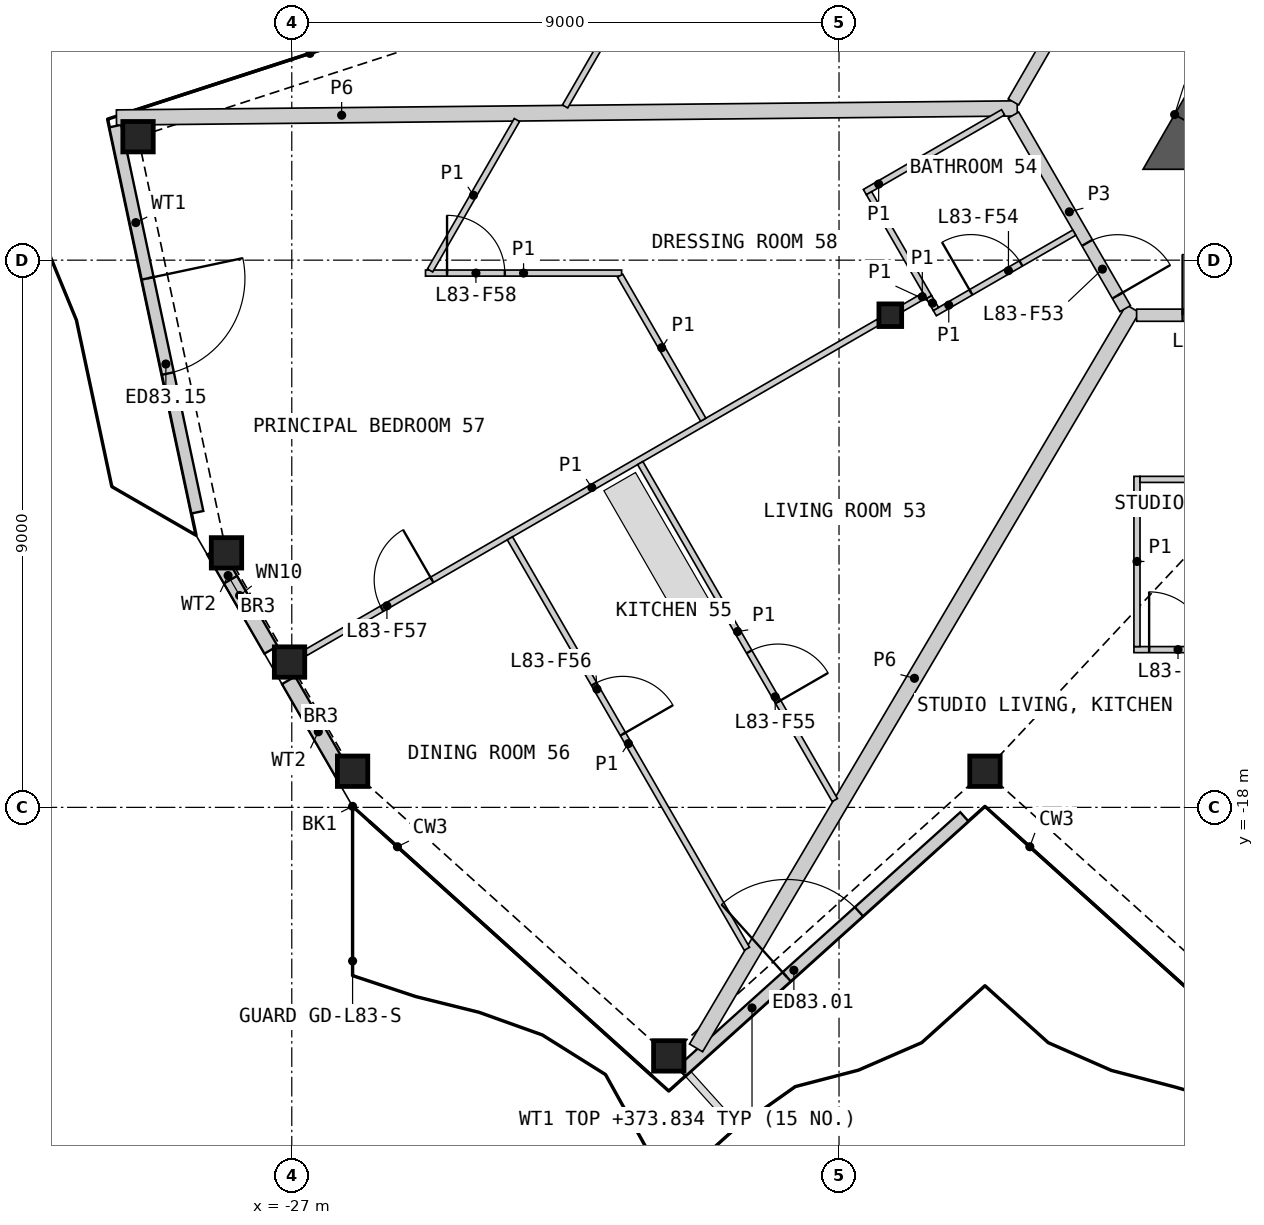
"""IFC4 building model, lengths in metres.
Left out: names, types, materials, properties, quantities, classifications, styles, units other than length and angle.
Written with IfcOpenShell. Run it as: python <this file> out.ifc"""

import sys

from ifc_helpers import new_model, si_unit, direction, frame, frame_2d, origin, origin_2d, place, context, subcontext, project, spatial, polyline, rectangle, hollow_rectangle, i_section, outline, extrude, element, fill, save


model = new_model("IFC4")
c1 = context("Model", 3, precision=1e-05, world=origin(), true_north=direction((0.0, 1.0)))
c2 = subcontext(c1, "Body", "Model", "MODEL_VIEW")
j1 = project(units=[si_unit("LENGTHUNIT", "METRE"), si_unit("PLANEANGLEUNIT", "RADIAN")], contexts=[c1])
p1 = place(None, origin())
s1 = spatial("IfcSite", under=j1, at=p1, CompositionType="ELEMENT")
p2 = place(p1, origin())
s2 = spatial("IfcBuilding", under=s1, at=p2, CompositionType="ELEMENT")
p3 = place(p2, frame((0.0, 0.0, 371.2)))
s3 = spatial("IfcBuildingStorey", under=s2, at=p3, CompositionType="ELEMENT", Elevation=371.2)
for number, where, z_axis, x_axis in (
    (1, (-26.0, -17.406, 0.0), (0.0, 0.0, 1.0), (1.0, 0.0, 0.0)),
    (2, (-20.8, -22.088, 0.0), (0.0, 0.0, 1.0), (1.0, 0.0, 0.0)),
    (3, (-15.6, -17.406, 0.0), (0.0, 0.0, 1.0), (1.0, 0.0, 0.0)),
    (4, (-29.529, -6.969, 0.0), (0.0, 0.0, 1.0), (1.0, 0.0, 0.0)),
    (5, (-28.074, -13.814, 0.0), (0.0, 0.0, 1.0), (1.0, 0.0, 0.0)),
    (6, (-27.037, -15.61, 0.0), (0.0, 0.0, 1.0), (1.0, 0.0, 0.0)),
):
    element("IfcColumn", number, at=place(p3, frame(where, z_axis=z_axis, x_axis=x_axis)), inside=s3, PredefinedType="COLUMN", context=c2, shape_type="SweptSolid", body=[
        extrude(hollow_rectangle(XDim=0.5, YDim=0.5, WallThickness=0.03, at=origin_2d()), origin(), (0.0, 0.0, 1.0), 3.4),
    ])
p4 = place(p3, frame((-17.157, -9.906, 0.0), z_axis=(0.0, 0.0, 1.0), x_axis=(1.0, 0.0, 0.0)))
e7 = element("IfcColumn", 7, at=p4, inside=s3, PredefinedType="COLUMN", context=c2, shape_type="SweptSolid", body=[
    extrude(i_section(OverallWidth=0.374, OverallDepth=0.372, WebThickness=0.016, FlangeThickness=0.026, at=origin_2d()), origin(), (0.0, 0.0, 1.0), 3.4),
])
p5 = place(p3, frame((-20.595, -22.346, 0.0), z_axis=(0.0, 0.0, 1.0), x_axis=(0.743137181878, 0.669139095339, 0.0)))
e8 = element("IfcWall", 8, at=p5, inside=s3, PredefinedType="SOLIDWALL", context=c2, shape_type="SweptSolid", body=[
    extrude(rectangle(XDim=6.265, YDim=0.2, at=frame_2d((3.133, 0.0))), origin(), (0.0, 0.0, 1.0), 2.634),
])
p6 = place(p5, frame((2.333, 0.0, 0.0)))
e9 = element("IfcOpeningElement", 9, at=p6, cuts=e8, PredefinedType="OPENING", context=c2, shape_type="SweptSolid", body=[
    extrude(rectangle(XDim=1.6, YDim=2.25, at=frame_2d((0.8, 1.125))), frame((0.0, 0.11, 0.0), z_axis=(0.0, -1.0, 0.0), x_axis=(1.0, 0.0, 0.0)), (0.0, 0.0, 1.0), 0.22),
])
p7 = place(p3, frame((-29.903, -6.795, 0.0), z_axis=(0.0, 0.0, 1.0), x_axis=(0.207923959653, -0.978144992832, 0.0)))
e10 = element("IfcWall", 10, at=p7, inside=s3, PredefinedType="SOLIDWALL", context=c2, shape_type="SweptSolid", body=[
    extrude(rectangle(XDim=6.493, YDim=0.2, at=frame_2d((3.247, 0.0))), origin(), (0.0, 0.0, 1.0), 2.634),
])
p8 = place(p7, frame((2.561, 0.0, 0.0)))
e11 = element("IfcOpeningElement", 11, at=p8, cuts=e10, PredefinedType="OPENING", context=c2, shape_type="SweptSolid", body=[
    extrude(rectangle(XDim=1.6, YDim=2.25, at=frame_2d((0.8, 1.125))), frame((0.0, 0.11, 0.0), z_axis=(0.0, -1.0, 0.0), x_axis=(1.0, 0.0, 0.0)), (0.0, 0.0, 1.0), 0.22),
])
p9 = place(p3, frame((-28.283, -13.779, 0.0), z_axis=(0.0, 0.0, 1.0), x_axis=(0.500044242988, -0.865999858577, 0.0)))
e12 = element("IfcWall", 12, at=p9, inside=s3, PredefinedType="SOLIDWALL", context=c2, shape_type="SweptSolid", body=[
    extrude(rectangle(XDim=1.883, YDim=0.25, at=frame_2d((0.941, 0.0))), origin(), (0.0, 0.0, 1.0), 2.634),
])
p10 = place(p9, frame((0.55, 0.0, 0.4)))
e13 = element("IfcOpeningElement", 13, at=p10, cuts=e12, PredefinedType="OPENING", context=c2, shape_type="SweptSolid", body=[
    extrude(rectangle(XDim=0.6, YDim=0.6, at=frame_2d((0.3, 0.3))), frame((0.0, 0.135, 0.0), z_axis=(0.0, -1.0, 0.0), x_axis=(1.0, 0.0, 0.0)), (0.0, 0.0, 1.0), 0.27),
])
p11 = place(p3, frame((-27.053, -15.91, 0.0), z_axis=(0.0, 0.0, 1.0), x_axis=(0.500017700655, -0.866015184065, 0.0)))
e14 = element("IfcWall", 14, at=p11, inside=s3, PredefinedType="SOLIDWALL", context=c2, shape_type="SweptSolid", body=[
    extrude(rectangle(XDim=1.957, YDim=0.25, at=frame_2d((0.978, 0.0))), origin(), (0.0, 0.0, 1.0), 2.634),
])
p12 = place(p3, frame((-9.941, -2.807, 0.0), z_axis=(0.0, 0.0, 1.0), x_axis=(-0.500020646047, -0.866013483456, 0.0)))
e15 = element("IfcWall", 15, at=p12, inside=s3, PredefinedType="SHEAR", context=c2, shape_type="SweptSolid", body=[
    extrude(rectangle(XDim=4.559, YDim=0.6, at=frame_2d((2.28, 0.0))), origin(), (0.0, 0.0, 1.0), 3.1),
])
p13 = place(p3, origin())
e16 = element("IfcWall", 16, at=p13, inside=s3, PredefinedType="SHEAR", context=c2, shape_type="SweptSolid", body=[
    extrude(outline(polyline([(-12.48, -6.606), (-11.961, -6.906), (-11.961, -7.506), (-13.0, -7.506), (-12.48, -6.606)])), origin(), (0.0, 0.0, 1.0), 3.1),
])
p14 = place(p3, frame((-29.883, -6.654, 0.0), z_axis=(0.0, 0.0, 1.0), x_axis=(0.999949143254, 0.010085182526, 0.0)))
e17 = element("IfcWall", 17, at=p14, inside=s3, PredefinedType="PARTITIONING", context=c2, shape_type="SweptSolid", body=[
    extrude(rectangle(XDim=14.815, YDim=0.25, at=frame_2d((7.408, 0.0))), origin(), (0.0, 0.0, 1.0), 2.33),
])
p15 = place(p3, frame((-20.351, -21.956, 0.0), z_axis=(0.0, 0.0, 1.0), x_axis=(0.508713003719, 0.860936164793, 0.0)))
e18 = element("IfcWall", 18, at=p15, inside=s3, PredefinedType="PARTITIONING", context=c2, shape_type="SweptSolid", body=[
    extrude(rectangle(XDim=14.122, YDim=0.25, at=frame_2d((7.061, 0.0))), origin(), (0.0, 0.0, 1.0), 2.33),
])
p16 = place(p3, frame((-13.106, -9.906, 0.0), z_axis=(0.0, 0.0, 1.0), x_axis=(1.0, 0.0, 0.0)))
e19 = element("IfcWall", 19, at=p16, inside=s3, PredefinedType="PARTITIONING", context=c2, shape_type="SweptSolid", body=[
    extrude(rectangle(XDim=4.331, YDim=0.2, at=frame_2d((2.165, 0.0))), origin(), (0.0, 0.0, 1.0), 3.1),
])
p17 = place(p16, frame((0.755, 0.0, 0.0)))
e20 = element("IfcOpeningElement", 20, at=p17, cuts=e19, PredefinedType="OPENING", context=c2, shape_type="SweptSolid", body=[
    extrude(rectangle(XDim=1.0, YDim=2.1, at=frame_2d((0.5, 1.05))), frame((0.0, 0.11, 0.0), z_axis=(0.0, -1.0, 0.0), x_axis=(1.0, 0.0, 0.0)), (0.0, 0.0, 1.0), 0.22),
])
p18 = place(p3, frame((-15.131, -6.397, 0.0), z_axis=(0.0, 0.0, 1.0), x_axis=(0.499986217557, 0.866033360935, 0.0)))
e21 = element("IfcWall", 21, at=p18, inside=s3, PredefinedType="PARTITIONING", context=c2, shape_type="SweptSolid", body=[
    extrude(rectangle(XDim=4.3, YDim=0.2, at=frame_2d((2.15, 0.0))), origin(), (0.0, 0.0, 1.0), 3.1),
])
p19 = place(p3, frame((-15.131, -6.614, 0.0), z_axis=(0.0, 0.0, 1.0), x_axis=(0.499967746641, -0.866044024469, 0.0)))
e22 = element("IfcWall", 22, at=p19, inside=s3, PredefinedType="PARTITIONING", context=c2, shape_type="SweptSolid", body=[
    extrude(rectangle(XDim=3.676, YDim=0.2, at=frame_2d((1.838, 0.0))), origin(), (0.0, 0.0, 1.0), 3.1),
])
p20 = place(p19, frame((2.426, 0.0, 0.0)))
e23 = element("IfcOpeningElement", 23, at=p20, cuts=e22, PredefinedType="OPENING", context=c2, shape_type="SweptSolid", body=[
    extrude(rectangle(XDim=1.0, YDim=2.1, at=frame_2d((0.5, 1.05))), frame((0.0, 0.11, 0.0), z_axis=(0.0, -1.0, 0.0), x_axis=(1.0, 0.0, 0.0)), (0.0, 0.0, 1.0), 0.22),
])
p21 = place(p3, frame((-26.777, -15.46, 0.0), z_axis=(0.0, 0.0, 1.0), x_axis=(0.866019680922, 0.500009912158, 0.0)))
e24 = element("IfcWall", 24, at=p21, inside=s3, PredefinedType="PARTITIONING", context=c2, shape_type="SweptSolid", body=[
    extrude(rectangle(XDim=10.881, YDim=0.1, at=frame_2d((5.44, 0.0))), origin(), (0.0, 0.0, 1.0), 2.33),
])
p22 = place(p21, frame((1.454, 0.0, 0.0)))
e25 = element("IfcOpeningElement", 25, at=p22, cuts=e24, PredefinedType="OPENING", context=c2, shape_type="SweptSolid", body=[
    extrude(rectangle(XDim=0.95, YDim=2.1, at=frame_2d((0.475, 1.05))), frame((0.0, 0.06, 0.0), z_axis=(0.0, -1.0, 0.0), x_axis=(1.0, 0.0, 0.0)), (0.0, 0.0, 1.0), 0.12),
])
p23 = place(p3, frame((-23.413, -13.575, 0.0), z_axis=(0.0, 0.0, 1.0), x_axis=(0.499998958472, -0.86602600511, 0.0)))
e26 = element("IfcWall", 26, at=p23, inside=s3, PredefinedType="PARTITIONING", context=c2, shape_type="SweptSolid", body=[
    extrude(rectangle(XDim=7.796, YDim=0.1, at=frame_2d((3.898, 0.0))), origin(), (0.0, 0.0, 1.0), 2.33),
])
p24 = place(p23, frame((2.768, 0.0, 0.0)))
e27 = element("IfcOpeningElement", 27, at=p24, cuts=e26, PredefinedType="OPENING", context=c2, shape_type="SweptSolid", body=[
    extrude(rectangle(XDim=0.95, YDim=2.1, at=frame_2d((0.475, 1.05))), frame((0.0, 0.06, 0.0), z_axis=(0.0, -1.0, 0.0), x_axis=(1.0, 0.0, 0.0)), (0.0, 0.0, 1.0), 0.12),
])
p25 = place(p3, frame((-22.505, -6.472, 0.0), z_axis=(0.0, 0.0, 1.0), x_axis=(0.499999516514, 0.866025682925, 0.0)))
e28 = element("IfcWall", 28, at=p25, inside=s3, PredefinedType="PARTITIONING", context=c2, shape_type="SweptSolid", body=[
    extrude(rectangle(XDim=6.407, YDim=0.1, at=frame_2d((3.204, 0.0))), origin(), (0.0, 0.0, 1.0), 2.33),
])
p26 = place(p25, frame((2.981, 0.0, 0.0)))
e29 = element("IfcOpeningElement", 29, at=p26, cuts=e28, PredefinedType="OPENING", context=c2, shape_type="SweptSolid", body=[
    extrude(rectangle(XDim=0.95, YDim=2.1, at=frame_2d((0.475, 1.05))), frame((0.0, 0.06, 0.0), z_axis=(0.0, -1.0, 0.0), x_axis=(1.0, 0.0, 0.0)), (0.0, 0.0, 1.0), 0.12),
])
p27 = place(p3, frame((-21.269, -12.337, 0.0), z_axis=(0.0, 0.0, 1.0), x_axis=(0.499983315828, -0.866035036182, 0.0)))
e30 = element("IfcWall", 30, at=p27, inside=s3, PredefinedType="PARTITIONING", context=c2, shape_type="SweptSolid", body=[
    extrude(rectangle(XDim=6.4, YDim=0.1, at=frame_2d((3.2, 0.0))), origin(), (0.0, 0.0, 1.0), 2.33),
])
p28 = place(p27, frame((3.584, 0.0, 0.0)))
e31 = element("IfcOpeningElement", 31, at=p28, cuts=e30, PredefinedType="OPENING", context=c2, shape_type="SweptSolid", body=[
    extrude(rectangle(XDim=0.95, YDim=2.1, at=frame_2d((0.475, 1.05))), frame((0.0, 0.06, 0.0), z_axis=(0.0, -1.0, 0.0), x_axis=(1.0, 0.0, 0.0)), (0.0, 0.0, 1.0), 0.12),
])
p29 = place(p3, frame((-13.15, -15.406, 0.0), z_axis=(0.0, 0.0, 1.0), x_axis=(1.0, 0.0, 0.0)))
e32 = element("IfcWall", 32, at=p29, inside=s3, PredefinedType="PARTITIONING", context=c2, shape_type="SweptSolid", body=[
    extrude(rectangle(XDim=5.5, YDim=0.1, at=frame_2d((2.75, 0.0))), origin(), (0.0, 0.0, 1.0), 2.33),
])
p30 = place(p29, frame((0.25, 0.0, 0.0)))
e33 = element("IfcOpeningElement", 33, at=p30, cuts=e32, PredefinedType="OPENING", context=c2, shape_type="SweptSolid", body=[
    extrude(rectangle(XDim=0.95, YDim=2.1, at=frame_2d((0.475, 1.05))), frame((0.0, 0.06, 0.0), z_axis=(0.0, -1.0, 0.0), x_axis=(1.0, 0.0, 0.0)), (0.0, 0.0, 1.0), 0.12),
])
p31 = place(p29, frame((3.591, 0.0, 0.0)))
e34 = element("IfcOpeningElement", 34, at=p31, cuts=e32, PredefinedType="OPENING", context=c2, shape_type="SweptSolid", body=[
    extrude(rectangle(XDim=0.95, YDim=2.1, at=frame_2d((0.475, 1.05))), frame((0.0, 0.06, 0.0), z_axis=(0.0, -1.0, 0.0), x_axis=(1.0, 0.0, 0.0)), (0.0, 0.0, 1.0), 0.12),
])
p32 = place(p3, frame((-24.801, -9.212, 0.0), z_axis=(0.0, 0.0, 1.0), x_axis=(1.0, 0.0, 0.0)))
e35 = element("IfcWall", 35, at=p32, inside=s3, PredefinedType="PARTITIONING", context=c2, shape_type="SweptSolid", body=[
    extrude(rectangle(XDim=3.226, YDim=0.1, at=frame_2d((1.613, 0.0))), origin(), (0.0, 0.0, 1.0), 2.33),
])
p33 = place(p32, frame((0.354, 0.0, 0.0)))
e36 = element("IfcOpeningElement", 36, at=p33, cuts=e35, PredefinedType="OPENING", context=c2, shape_type="SweptSolid", body=[
    extrude(rectangle(XDim=0.95, YDim=2.1, at=frame_2d((0.475, 1.05))), frame((0.0, 0.06, 0.0), z_axis=(0.0, -1.0, 0.0), x_axis=(1.0, 0.0, 0.0)), (0.0, 0.0, 1.0), 0.12),
])
p34 = place(p3, frame((-24.726, -9.169, 0.0), z_axis=(0.0, 0.0, 1.0), x_axis=(0.499971481985, 0.866041868042, 0.0)))
e37 = element("IfcWall", 37, at=p34, inside=s3, PredefinedType="PARTITIONING", context=c2, shape_type="SweptSolid", body=[
    extrude(rectangle(XDim=2.857, YDim=0.1, at=frame_2d((1.429, 0.0))), origin(), (0.0, 0.0, 1.0), 2.33),
])
p35 = place(p3, frame((-21.6, -9.256, 0.0), z_axis=(0.0, 0.0, 1.0), x_axis=(0.500018733116, -0.866014587945, 0.0)))
e38 = element("IfcWall", 38, at=p35, inside=s3, PredefinedType="PARTITIONING", context=c2, shape_type="SweptSolid", body=[
    extrude(rectangle(XDim=2.734, YDim=0.1, at=frame_2d((1.367, 0.0))), origin(), (0.0, 0.0, 1.0), 2.33),
])
p36 = place(p3, frame((-13.1, -15.356, 0.0), z_axis=(0.0, 0.0, 1.0), x_axis=(0.0, 1.0, 0.0)))
e39 = element("IfcWall", 39, at=p36, inside=s3, PredefinedType="PARTITIONING", context=c2, shape_type="SweptSolid", body=[
    extrude(rectangle(XDim=2.8, YDim=0.1, at=frame_2d((1.4, 0.0))), origin(), (0.0, 0.0, 1.0), 2.33),
])
p37 = place(p3, frame((-17.575, -7.881, 0.0), z_axis=(0.0, 0.0, 1.0), x_axis=(0.866036909293, 0.499980071345, 0.0)))
e40 = element("IfcWall", 40, at=p37, inside=s3, PredefinedType="PARTITIONING", context=c2, shape_type="SweptSolid", body=[
    extrude(rectangle(XDim=2.625, YDim=0.1, at=frame_2d((1.312, 0.0))), origin(), (0.0, 0.0, 1.0), 2.33),
])
p38 = place(p3, frame((-13.05, -12.606, 0.0), z_axis=(0.0, 0.0, 1.0), x_axis=(1.0, 0.0, 0.0)))
e41 = element("IfcWall", 41, at=p38, inside=s3, PredefinedType="PARTITIONING", context=c2, shape_type="SweptSolid", body=[
    extrude(rectangle(XDim=2.525, YDim=0.1, at=frame_2d((1.263, 0.0))), origin(), (0.0, 0.0, 1.0), 2.33),
])
p39 = place(p3, frame((-16.425, -9.872, 0.0), z_axis=(0.0, 0.0, 1.0), x_axis=(0.86603978909, 0.499975083092, 0.0)))
e42 = element("IfcWall", 42, at=p39, inside=s3, PredefinedType="PARTITIONING", context=c2, shape_type="SweptSolid", body=[
    extrude(rectangle(XDim=2.649, YDim=0.1, at=frame_2d((1.325, 0.0))), origin(), (0.0, 0.0, 1.0), 2.33),
])
p40 = place(p39, frame((0.686, 0.0, 0.0)))
e43 = element("IfcOpeningElement", 43, at=p40, cuts=e42, PredefinedType="OPENING", context=c2, shape_type="SweptSolid", body=[
    extrude(rectangle(XDim=0.95, YDim=2.1, at=frame_2d((0.475, 1.05))), frame((0.0, 0.06, 0.0), z_axis=(0.0, -1.0, 0.0), x_axis=(1.0, 0.0, 0.0)), (0.0, 0.0, 1.0), 0.12),
])
p41 = place(p3, frame((-17.507, -7.899, 0.0), z_axis=(0.0, 0.0, 1.0), x_axis=(0.500011643316, -0.866018681408, 0.0)))
e44 = element("IfcWall", 44, at=p41, inside=s3, PredefinedType="PARTITIONING", context=c2, shape_type="SweptSolid", body=[
    extrude(rectangle(XDim=1.973, YDim=0.1, at=frame_2d((0.987, 0.0))), origin(), (0.0, 0.0, 1.0), 2.33),
])
p42 = place(p3, frame((-16.96, -9.792, 0.0), z_axis=(0.0, 0.0, 1.0), x_axis=(0.866137484628, 0.499805820016, 0.0)))
e45 = element("IfcWall", 45, at=p42, inside=s3, PredefinedType="PARTITIONING", context=c2, shape_type="SweptSolid", body=[
    extrude(rectangle(XDim=0.423, YDim=0.1, at=frame_2d((0.211, 0.0))), origin(), (0.0, 0.0, 1.0), 2.33),
])
p43 = place(p3, frame((-16.519, -9.61, 0.0), z_axis=(0.0, 0.0, 1.0), x_axis=(0.50245032488, -0.864606078528, 0.0)))
e46 = element("IfcWall", 46, at=p43, inside=s3, PredefinedType="PARTITIONING", context=c2, shape_type="SweptSolid", body=[
    extrude(rectangle(XDim=0.224, YDim=0.1, at=frame_2d((0.112, 0.0))), origin(), (0.0, 0.0, 1.0), 2.33),
])
p44 = place(p6, origin())
e47 = element("IfcDoor", 47, at=p44, inside=s3, OperationType="DOUBLE_DOOR_SINGLE_SWING", PredefinedType="DOOR", context=c2, shape_type="SweptSolid", body=[
    extrude(rectangle(XDim=1.6, YDim=2.25, at=frame_2d((0.8, 1.125))), frame((0.0, 0.025, 0.0), z_axis=(0.0, -1.0, 0.0), x_axis=(1.0, 0.0, 0.0)), (0.0, 0.0, 1.0), 0.05),
])
fill(e9, e47)
p45 = place(p8, origin())
e48 = element("IfcDoor", 48, at=p45, inside=s3, OperationType="DOUBLE_DOOR_SINGLE_SWING", PredefinedType="DOOR", context=c2, shape_type="SweptSolid", body=[
    extrude(rectangle(XDim=1.6, YDim=2.25, at=frame_2d((0.8, 1.125))), frame((0.0, 0.025, 0.0), z_axis=(0.0, -1.0, 0.0), x_axis=(1.0, 0.0, 0.0)), (0.0, 0.0, 1.0), 0.05),
])
fill(e11, e48)
p46 = place(p10, origin())
e49 = element("IfcWindow", 49, at=p46, inside=s3, PartitioningType="SINGLE_PANEL", PredefinedType="WINDOW", context=c2, shape_type="SweptSolid", body=[
    extrude(rectangle(XDim=0.6, YDim=0.6, at=frame_2d((0.3, 0.3))), frame((0.0, 0.03, 0.0), z_axis=(0.0, -1.0, 0.0), x_axis=(1.0, 0.0, 0.0)), (0.0, 0.0, 1.0), 0.06),
])
fill(e13, e49)
p47 = place(p17, origin())
e50 = element("IfcDoor", 50, at=p47, inside=s3, OperationType="SINGLE_SWING_LEFT", PredefinedType="DOOR", context=c2, shape_type="SweptSolid", body=[
    extrude(rectangle(XDim=1.0, YDim=2.1, at=frame_2d((0.5, 1.05))), frame((0.0, 0.025, 0.0), z_axis=(0.0, -1.0, 0.0), x_axis=(1.0, 0.0, 0.0)), (0.0, 0.0, 1.0), 0.05),
])
fill(e20, e50)
p48 = place(p30, origin())
e51 = element("IfcDoor", 51, at=p48, inside=s3, OperationType="SINGLE_SWING_LEFT", PredefinedType="DOOR", context=c2, shape_type="SweptSolid", body=[
    extrude(rectangle(XDim=0.95, YDim=2.1, at=frame_2d((0.475, 1.05))), frame((0.0, 0.025, 0.0), z_axis=(0.0, -1.0, 0.0), x_axis=(1.0, 0.0, 0.0)), (0.0, 0.0, 1.0), 0.05),
])
fill(e33, e51)
p49 = place(p20, origin())
e52 = element("IfcDoor", 52, at=p49, inside=s3, OperationType="SINGLE_SWING_RIGHT", PredefinedType="DOOR", context=c2, shape_type="SweptSolid", body=[
    extrude(rectangle(XDim=1.0, YDim=2.1, at=frame_2d((0.5, 1.05))), frame((0.0, 0.025, 0.0), z_axis=(0.0, -1.0, 0.0), x_axis=(1.0, 0.0, 0.0)), (0.0, 0.0, 1.0), 0.05),
])
fill(e23, e52)
p50 = place(p40, origin())
e53 = element("IfcDoor", 53, at=p50, inside=s3, OperationType="SINGLE_SWING_LEFT", PredefinedType="DOOR", context=c2, shape_type="SweptSolid", body=[
    extrude(rectangle(XDim=0.95, YDim=2.1, at=frame_2d((0.475, 1.05))), frame((0.0, 0.025, 0.0), z_axis=(0.0, -1.0, 0.0), x_axis=(1.0, 0.0, 0.0)), (0.0, 0.0, 1.0), 0.05),
])
fill(e43, e53)
p51 = place(p28, origin())
e54 = element("IfcDoor", 54, at=p51, inside=s3, OperationType="SINGLE_SWING_RIGHT", PredefinedType="DOOR", context=c2, shape_type="SweptSolid", body=[
    extrude(rectangle(XDim=0.95, YDim=2.1, at=frame_2d((0.475, 1.05))), frame((0.0, 0.025, 0.0), z_axis=(0.0, -1.0, 0.0), x_axis=(1.0, 0.0, 0.0)), (0.0, 0.0, 1.0), 0.05),
])
fill(e31, e54)
p52 = place(p24, origin())
e55 = element("IfcDoor", 55, at=p52, inside=s3, OperationType="SINGLE_SWING_RIGHT", PredefinedType="DOOR", context=c2, shape_type="SweptSolid", body=[
    extrude(rectangle(XDim=0.95, YDim=2.1, at=frame_2d((0.475, 1.05))), frame((0.0, 0.025, 0.0), z_axis=(0.0, -1.0, 0.0), x_axis=(1.0, 0.0, 0.0)), (0.0, 0.0, 1.0), 0.05),
])
fill(e27, e55)
p53 = place(p22, origin())
e56 = element("IfcDoor", 56, at=p53, inside=s3, OperationType="SINGLE_SWING_RIGHT", PredefinedType="DOOR", context=c2, shape_type="SweptSolid", body=[
    extrude(rectangle(XDim=0.95, YDim=2.1, at=frame_2d((0.475, 1.05))), frame((0.0, 0.025, 0.0), z_axis=(0.0, -1.0, 0.0), x_axis=(1.0, 0.0, 0.0)), (0.0, 0.0, 1.0), 0.05),
])
fill(e25, e56)
p54 = place(p33, origin())
e57 = element("IfcDoor", 57, at=p54, inside=s3, OperationType="SINGLE_SWING_LEFT", PredefinedType="DOOR", context=c2, shape_type="SweptSolid", body=[
    extrude(rectangle(XDim=0.95, YDim=2.1, at=frame_2d((0.475, 1.05))), frame((0.0, 0.025, 0.0), z_axis=(0.0, -1.0, 0.0), x_axis=(1.0, 0.0, 0.0)), (0.0, 0.0, 1.0), 0.05),
])
fill(e36, e57)
save(model, sys.argv[1])
